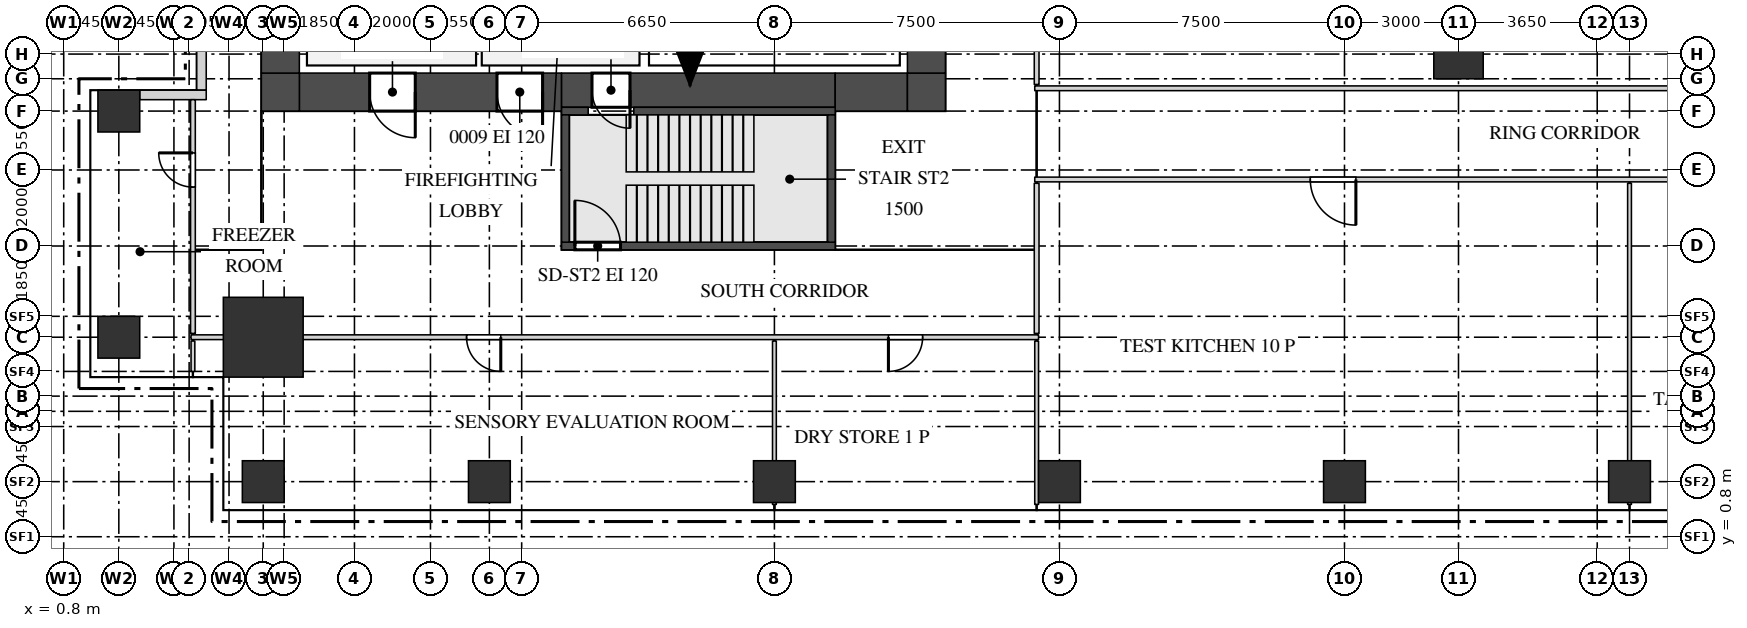
"""IFC4 building model, lengths in metres.
Left out: names, types, materials, properties, quantities, classifications, styles, units other than length and angle.
Written with IfcOpenShell. Run it as: python <this file> out.ifc"""

import sys

from ifc_helpers import new_model, si_unit, direction, frame, frame_2d, origin, origin_2d, place, context, subcontext, project, spatial, rectangle, extrude, source, transform, mapped, element, fill, save


model = new_model("IFC4")
c1 = context("Model", 3, precision=1e-05, world=origin(), true_north=direction((0.0, 1.0)))
c2 = subcontext(c1, "Body", "Model", "MODEL_VIEW")
j1 = project(units=[si_unit("LENGTHUNIT", "METRE"), si_unit("PLANEANGLEUNIT", "RADIAN")], contexts=[c1])
p1 = place(None, origin())
s1 = spatial("IfcSite", under=j1, at=p1, CompositionType="ELEMENT")
p2 = place(p1, origin())
s2 = spatial("IfcBuilding", under=s1, at=p2, CompositionType="ELEMENT")
p3 = place(p2, frame((0.0, 0.0, 114.7)))
s3 = spatial("IfcBuildingStorey", under=s2, at=p3, CompositionType="ELEMENT", Elevation=114.7)
m1 = source(origin(), c2, "Body", "SweptSolid", [
    extrude(rectangle(XDim=6.9, YDim=1.0, at=frame_2d((3.45, 0.0))), origin(), (0.0, 0.0, 1.0), 4.1),
])
p4 = place(p3, frame((7.0, 12.5, 0.0), z_axis=(0.0, 0.0, 1.0), x_axis=(1.0, 0.0, 0.0)))
e1 = element("IfcWall", 1, at=p4, inside=s3, PredefinedType="SHEAR", context=c2, shape_type="MappedRepresentation", body=[
    mapped(m1, transform((0.0, 0.0, 0.0))),
])
m2 = source(origin(), c2, "Body", "SweptSolid", [
    extrude(rectangle(XDim=1.2, YDim=2.1, at=frame_2d((0.6, 1.05))), frame((0.0, 0.51, 0.0), z_axis=(0.0, -1.0, 0.0), x_axis=(1.0, 0.0, 0.0)), (0.0, 0.0, 1.0), 1.02),
])
p5 = place(p4, frame((5.2, 0.0, 0.0)))
e2 = element("IfcOpeningElement", 2, at=p5, cuts=e1, PredefinedType="OPENING", context=c2, shape_type="MappedRepresentation", body=[
    mapped(m2, transform((0.0, 0.0, 0.0))),
])
p6 = place(p4, frame((1.85, 0.0, 0.0)))
e3 = element("IfcOpeningElement", 3, at=p6, cuts=e1, PredefinedType="OPENING", context=c2, shape_type="MappedRepresentation", body=[
    mapped(m2, transform((0.0, 0.0, 0.0))),
])
m3 = source(origin(), c2, "Body", "SweptSolid", [
    extrude(rectangle(XDim=7.2, YDim=0.9, at=frame_2d((3.6, 0.0))), origin(), (0.0, 0.0, 1.0), 4.1),
])
p7 = place(p3, frame((13.9, 12.55, 0.0), z_axis=(0.0, 0.0, 1.0), x_axis=(1.0, 0.0, 0.0)))
e4 = element("IfcWall", 4, at=p7, inside=s3, PredefinedType="SHEAR", context=c2, shape_type="MappedRepresentation", body=[
    mapped(m3, transform((0.0, 0.0, 0.0))),
])
m4 = source(origin(), c2, "Body", "SweptSolid", [
    extrude(rectangle(XDim=1.0, YDim=2.1, at=frame_2d((0.5, 1.05))), frame((0.0, 0.46, 0.0), z_axis=(0.0, -1.0, 0.0), x_axis=(1.0, 0.0, 0.0)), (0.0, 0.0, 1.0), 0.92),
])
p8 = place(p7, frame((0.8, 0.0, 0.0)))
e5 = element("IfcOpeningElement", 5, at=p8, cuts=e4, PredefinedType="OPENING", context=c2, shape_type="MappedRepresentation", body=[
    mapped(m4, transform((0.0, 0.0, 0.0))),
])
m5 = source(origin(), c2, "Body", "SweptSolid", [
    extrude(rectangle(XDim=1.9, YDim=1.0, at=frame_2d((0.95, 0.0))), origin(), (0.0, 0.0, 1.0), 4.1),
])
p9 = place(p3, frame((21.1, 12.5, 0.0), z_axis=(0.0, 0.0, 1.0), x_axis=(1.0, 0.0, 0.0)))
e6 = element("IfcWall", 6, at=p9, inside=s3, PredefinedType="SHEAR", context=c2, shape_type="MappedRepresentation", body=[
    mapped(m5, transform((0.0, 0.0, 0.0))),
])
m6 = source(origin(), c2, "Body", "SweptSolid", [
    extrude(rectangle(XDim=1.0, YDim=1.0, at=frame_2d((0.5, 0.0))), origin(), (0.0, 0.0, 1.0), 4.1),
])
for number, where, z_axis, x_axis in (
    (7, (23.0, 12.5, 0.0), (0.0, 0.0, 1.0), (1.0, 0.0, 0.0)),
    (8, (6.0, 12.5, 0.0), (0.0, 0.0, 1.0), (1.0, 0.0, 0.0)),
):
    element("IfcWall", number, at=place(p3, frame(where, z_axis=z_axis, x_axis=x_axis)), inside=s3, PredefinedType="SHEAR", context=c2, shape_type="MappedRepresentation", body=[
        mapped(m6, transform((0.0, 0.0, 0.0))),
    ])
m7 = source(origin(), c2, "Body", "SweptSolid", [
    extrude(rectangle(XDim=28.0, YDim=1.0, at=frame_2d((14.0, 0.0))), origin(), (0.0, 0.0, 1.0), 4.1),
])
p10 = place(p3, frame((23.5, 13.0, 0.0), z_axis=(0.0, 0.0, 1.0), x_axis=(0.0, 1.0, 0.0)))
e9 = element("IfcWall", 9, at=p10, inside=s3, PredefinedType="SHEAR", context=c2, shape_type="MappedRepresentation", body=[
    mapped(m7, transform((0.0, 0.0, 0.0))),
])
m8 = source(origin(), c2, "Body", "SweptSolid", [
    extrude(rectangle(XDim=1.8, YDim=2.1, at=frame_2d((0.9, 1.05))), frame((0.0, 0.51, 0.0), z_axis=(0.0, -1.0, 0.0), x_axis=(1.0, 0.0, 0.0)), (0.0, 0.0, 1.0), 1.02),
])
p11 = place(p10, frame((22.6, 0.0, 0.0)))
e10 = element("IfcOpeningElement", 10, at=p11, cuts=e9, PredefinedType="OPENING", context=c2, shape_type="MappedRepresentation", body=[
    mapped(m8, transform((0.0, 0.0, 0.0))),
])
p12 = place(p10, frame((13.85, 0.0, 0.0)))
e11 = element("IfcOpeningElement", 11, at=p12, cuts=e9, PredefinedType="OPENING", context=c2, shape_type="MappedRepresentation", body=[
    mapped(m2, transform((0.0, 0.0, 0.0))),
])
m9 = source(origin(), c2, "Body", "SweptSolid", [
    extrude(rectangle(XDim=0.9, YDim=2.1, at=frame_2d((0.45, 1.05))), frame((0.0, 0.51, 0.0), z_axis=(0.0, -1.0, 0.0), x_axis=(1.0, 0.0, 0.0)), (0.0, 0.0, 1.0), 1.02),
])
p13 = place(p10, frame((2.15, 0.0, 0.0)))
e12 = element("IfcOpeningElement", 12, at=p13, cuts=e9, PredefinedType="OPENING", context=c2, shape_type="MappedRepresentation", body=[
    mapped(m9, transform((0.0, 0.0, 0.0))),
])
p14 = place(p10, frame((7.0, 0.0, 0.0)))
e13 = element("IfcOpeningElement", 13, at=p14, cuts=e9, PredefinedType="OPENING", context=c2, shape_type="MappedRepresentation", body=[
    mapped(m9, transform((0.0, 0.0, 0.0))),
])
p15 = place(p3, frame((6.5, 13.0, 0.0), z_axis=(0.0, 0.0, 1.0), x_axis=(0.0, 1.0, 0.0)))
e14 = element("IfcWall", 14, at=p15, inside=s3, PredefinedType="SHEAR", context=c2, shape_type="MappedRepresentation", body=[
    mapped(m7, transform((0.0, 0.0, 0.0))),
])
m10 = source(origin(), c2, "Body", "SweptSolid", [
    extrude(rectangle(XDim=0.7, YDim=0.2, at=frame_2d((0.35, 0.0))), origin(), (0.0, 0.0, 1.0), 4.1),
])
p16 = place(p3, frame((13.9, 12.0, 0.0), z_axis=(0.0, 0.0, 1.0), x_axis=(1.0, 0.0, 0.0)))
e15 = element("IfcWall", 15, at=p16, inside=s3, PredefinedType="SHEAR", context=c2, shape_type="MappedRepresentation", body=[
    mapped(m10, transform((0.0, 0.0, 0.0))),
])
m11 = source(origin(), c2, "Body", "SweptSolid", [
    extrude(rectangle(XDim=5.3, YDim=0.2, at=frame_2d((2.65, 0.0))), origin(), (0.0, 0.0, 1.0), 4.1),
])
p17 = place(p3, frame((15.8, 12.0, 0.0), z_axis=(0.0, 0.0, 1.0), x_axis=(1.0, 0.0, 0.0)))
e16 = element("IfcWall", 16, at=p17, inside=s3, PredefinedType="SHEAR", context=c2, shape_type="MappedRepresentation", body=[
    mapped(m11, transform((0.0, 0.0, 0.0))),
])
m12 = source(origin(), c2, "Body", "SweptSolid", [
    extrude(rectangle(XDim=7.2, YDim=0.2, at=frame_2d((3.6, 0.0))), origin(), (0.0, 0.0, 1.0), 4.1),
])
p18 = place(p3, frame((13.9, 8.45, 0.0), z_axis=(0.0, 0.0, 1.0), x_axis=(1.0, 0.0, 0.0)))
e17 = element("IfcWall", 17, at=p18, inside=s3, PredefinedType="SHEAR", context=c2, shape_type="MappedRepresentation", body=[
    mapped(m12, transform((0.0, 0.0, 0.0))),
])
m13 = source(origin(), c2, "Body", "SweptSolid", [
    extrude(rectangle(XDim=1.2, YDim=2.1, at=frame_2d((0.6, 1.05))), frame((0.0, 0.11, 0.0), z_axis=(0.0, -1.0, 0.0), x_axis=(1.0, 0.0, 0.0)), (0.0, 0.0, 1.0), 0.22),
])
p19 = place(p18, frame((0.35, 0.0, 0.0)))
e18 = element("IfcOpeningElement", 18, at=p19, cuts=e17, PredefinedType="OPENING", context=c2, shape_type="MappedRepresentation", body=[
    mapped(m13, transform((0.0, 0.0, 0.0))),
])
m14 = source(origin(), c2, "Body", "SweptSolid", [
    extrude(rectangle(XDim=3.35, YDim=0.2, at=frame_2d((1.675, 0.0))), origin(), (0.0, 0.0, 1.0), 4.1),
])
for number, where, z_axis, x_axis in (
    (19, (21.0, 8.55, 0.0), (0.0, 0.0, 1.0), (0.0, 1.0, 0.0)),
    (20, (14.0, 8.55, 0.0), (0.0, 0.0, 1.0), (0.0, 1.0, 0.0)),
):
    element("IfcWall", number, at=place(p3, frame(where, z_axis=z_axis, x_axis=x_axis)), inside=s3, PredefinedType="SHEAR", context=c2, shape_type="MappedRepresentation", body=[
        mapped(m14, transform((0.0, 0.0, 0.0))),
    ])
m15 = source(origin(), c2, "Body", "SweptSolid", [
    extrude(rectangle(XDim=2.1, YDim=2.1, at=origin_2d()), origin(), (0.0, 0.0, 1.0), 4.4),
])
p20 = place(p3, frame((6.05, 6.05, 0.0), z_axis=(0.0, 0.0, 1.0), x_axis=(1.0, 0.0, 0.0)))
e21 = element("IfcColumn", 21, at=p20, inside=s3, PredefinedType="COLUMN", context=c2, shape_type="MappedRepresentation", body=[
    mapped(m15, transform((0.0, 0.0, 0.0))),
])
m16 = source(origin(), c2, "Body", "SweptSolid", [
    extrude(rectangle(XDim=1.1, YDim=1.1, at=origin_2d()), origin(), (0.0, 0.0, 1.0), 4.1),
])
for number, where, z_axis, x_axis in (
    (22, (6.05, 2.25, 0.0), (0.0, 0.0, 1.0), (1.0, 0.0, 0.0)),
    (23, (12.0, 2.25, 0.0), (0.0, 0.0, 1.0), (1.0, 0.0, 0.0)),
    (24, (19.5, 2.25, 0.0), (0.0, 0.0, 1.0), (1.0, 0.0, 0.0)),
    (25, (27.0, 2.25, 0.0), (0.0, 0.0, 1.0), (1.0, 0.0, 0.0)),
    (26, (34.5, 2.25, 0.0), (0.0, 0.0, 1.0), (1.0, 0.0, 0.0)),
    (27, (42.0, 2.25, 0.0), (0.0, 0.0, 1.0), (1.0, 0.0, 0.0)),
    (28, (2.25, 6.05, 0.0), (0.0, 0.0, 1.0), (1.0, 0.0, 0.0)),
    (29, (2.25, 12.0, 0.0), (0.0, 0.0, 1.0), (1.0, 0.0, 0.0)),
):
    element("IfcColumn", number, at=place(p3, frame(where, z_axis=z_axis, x_axis=x_axis)), inside=s3, PredefinedType="COLUMN", context=c2, shape_type="MappedRepresentation", body=[
        mapped(m16, transform((0.0, 0.0, 0.0))),
    ])
m17 = source(origin(), c2, "Body", "SweptSolid", [
    extrude(rectangle(XDim=1.3, YDim=1.3, at=origin_2d()), origin(), (0.0, 0.0, 1.0), 4.1),
])
p21 = place(p3, frame((37.5, 13.5, 0.0), z_axis=(0.0, 0.0, 1.0), x_axis=(1.0, 0.0, 0.0)))
e30 = element("IfcColumn", 30, at=p21, inside=s3, PredefinedType="COLUMN", context=c2, shape_type="MappedRepresentation", body=[
    mapped(m17, transform((0.0, 0.0, 0.0))),
])
m18 = source(origin(), c2, "Body", "SweptSolid", [
    extrude(rectangle(XDim=6.4, YDim=0.25, at=frame_2d((3.2, 0.0))), origin(), (0.0, 0.0, 1.0), 3.5),
])
p22 = place(p3, frame((4.425, 12.55, 0.0), z_axis=(0.0, 0.0, 1.0), x_axis=(0.0, 1.0, 0.0)))
e31 = element("IfcWall", 31, at=p22, inside=s3, PredefinedType="SOLIDWALL", context=c2, shape_type="MappedRepresentation", body=[
    mapped(m18, transform((0.0, 0.0, 0.0))),
])
m19 = source(origin(), c2, "Body", "SweptSolid", [
    extrude(rectangle(XDim=1.65, YDim=2.4, at=frame_2d((0.825, 1.2))), frame((0.0, 0.135, 0.0), z_axis=(0.0, -1.0, 0.0), x_axis=(1.0, 0.0, 0.0)), (0.0, 0.0, 1.0), 0.27),
])
p23 = place(p22, frame((0.35, 0.0, 0.0)))
e32 = element("IfcOpeningElement", 32, at=p23, cuts=e31, PredefinedType="OPENING", context=c2, shape_type="MappedRepresentation", body=[
    mapped(m19, transform((0.0, 0.0, 0.0))),
])
p24 = place(p22, frame((4.4, 0.0, 0.0)))
e33 = element("IfcOpeningElement", 33, at=p24, cuts=e31, PredefinedType="OPENING", context=c2, shape_type="MappedRepresentation", body=[
    mapped(m19, transform((0.0, 0.0, 0.0))),
])
m20 = source(origin(), c2, "Body", "SweptSolid", [
    extrude(rectangle(XDim=1.8, YDim=2.4, at=frame_2d((0.9, 1.2))), frame((0.0, 0.135, 0.0), z_axis=(0.0, -1.0, 0.0), x_axis=(1.0, 0.0, 0.0)), (0.0, 0.0, 1.0), 0.27),
])
p25 = place(p22, frame((2.3, 0.0, 0.0)))
e34 = element("IfcOpeningElement", 34, at=p25, cuts=e31, PredefinedType="OPENING", context=c2, shape_type="MappedRepresentation", body=[
    mapped(m20, transform((0.0, 0.0, 0.0))),
])
m21 = source(origin(), c2, "Body", "SweptSolid", [
    extrude(rectangle(XDim=1.75, YDim=0.25, at=frame_2d((0.875, 0.0))), origin(), (0.0, 0.0, 1.0), 3.5),
])
p26 = place(p3, frame((2.8, 12.425, 0.0), z_axis=(0.0, 0.0, 1.0), x_axis=(1.0, 0.0, 0.0)))
e35 = element("IfcWall", 35, at=p26, inside=s3, PredefinedType="SOLIDWALL", context=c2, shape_type="MappedRepresentation", body=[
    mapped(m21, transform((0.0, 0.0, 0.0))),
])
m22 = source(origin(), c2, "Body", "SweptSolid", [
    extrude(rectangle(XDim=4.3, YDim=0.1, at=frame_2d((2.15, 0.0))), origin(), (0.0, 0.0, 1.0), 3.77),
])
p27 = place(p3, frame((19.5, 1.65, 0.0), z_axis=(0.0, 0.0, 1.0), x_axis=(0.0, 1.0, 0.0)))
e36 = element("IfcWall", 36, at=p27, inside=s3, PredefinedType="PARTITIONING", context=c2, shape_type="MappedRepresentation", body=[
    mapped(m22, transform((0.0, 0.0, 0.0))),
])
m23 = source(origin(), c2, "Body", "SweptSolid", [
    extrude(rectangle(XDim=4.3, YDim=0.1, at=frame_2d((2.15, 0.0))), origin(), (0.0, 0.0, 1.0), 4.2),
])
p28 = place(p3, frame((26.4, 1.65, 0.0), z_axis=(0.0, 0.0, 1.0), x_axis=(0.0, 1.0, 0.0)))
e37 = element("IfcWall", 37, at=p28, inside=s3, PredefinedType="PARTITIONING", context=c2, shape_type="MappedRepresentation", body=[
    mapped(m23, transform((0.0, 0.0, 0.0))),
])
m24 = source(origin(), c2, "Body", "SweptSolid", [
    extrude(rectangle(XDim=8.45, YDim=0.1, at=frame_2d((4.225, 0.0))), origin(), (0.0, 0.0, 1.0), 3.6),
])
p29 = place(p3, frame((42.0, 1.65, 0.0), z_axis=(0.0, 0.0, 1.0), x_axis=(0.0, 1.0, 0.0)))
e38 = element("IfcWall", 38, at=p29, inside=s3, PredefinedType="PARTITIONING", context=c2, shape_type="MappedRepresentation", body=[
    mapped(m24, transform((0.0, 0.0, 0.0))),
])
m25 = source(origin(), c2, "Body", "SweptSolid", [
    extrude(rectangle(XDim=0.8, YDim=0.1, at=frame_2d((0.4, 0.0))), origin(), (0.0, 0.0, 1.0), 4.2),
])
p30 = place(p3, frame((4.2, 5.15, 0.0), z_axis=(0.0, 0.0, 1.0), x_axis=(0.0, 1.0, 0.0)))
e39 = element("IfcWall", 39, at=p30, inside=s3, PredefinedType="PARTITIONING", context=c2, shape_type="MappedRepresentation", body=[
    mapped(m25, transform((0.0, 0.0, 0.0))),
])
m26 = source(origin(), c2, "Body", "SweptSolid", [
    extrude(rectangle(XDim=22.3, YDim=0.125, at=frame_2d((11.15, 0.0))), origin(), (0.0, 0.0, 1.0), 3.55),
])
p31 = place(p3, frame((4.15, 6.05, 0.0), z_axis=(0.0, 0.0, 1.0), x_axis=(1.0, 0.0, 0.0)))
e40 = element("IfcWall", 40, at=p31, inside=s3, PredefinedType="PARTITIONING", context=c2, shape_type="MappedRepresentation", body=[
    mapped(m26, transform((0.0, 0.0, 0.0))),
])
m27 = source(origin(), c2, "Body", "SweptSolid", [
    extrude(rectangle(XDim=0.9, YDim=2.1, at=frame_2d((0.45, 1.05))), frame((0.0, 0.073, 0.0), z_axis=(0.0, -1.0, 0.0), x_axis=(1.0, 0.0, 0.0)), (0.0, 0.0, 1.0), 0.145),
])
p32 = place(p31, frame((7.25, 0.0, 0.0)))
e41 = element("IfcOpeningElement", 41, at=p32, cuts=e40, PredefinedType="OPENING", context=c2, shape_type="MappedRepresentation", body=[
    mapped(m27, transform((0.0, 0.0, 0.0))),
])
p33 = place(p31, frame((18.35, 0.0, 0.0)))
e42 = element("IfcOpeningElement", 42, at=p33, cuts=e40, PredefinedType="OPENING", context=c2, shape_type="MappedRepresentation", body=[
    mapped(m27, transform((0.0, 0.0, 0.0))),
])
m28 = source(origin(), c2, "Body", "SweptSolid", [
    extrude(rectangle(XDim=6.15, YDim=0.125, at=frame_2d((3.075, 0.0))), origin(), (0.0, 0.0, 1.0), 4.2),
])
p34 = place(p3, frame((4.2, 6.15, 0.0), z_axis=(0.0, 0.0, 1.0), x_axis=(0.0, 1.0, 0.0)))
e43 = element("IfcWall", 43, at=p34, inside=s3, PredefinedType="PARTITIONING", context=c2, shape_type="MappedRepresentation", body=[
    mapped(m28, transform((0.0, 0.0, 0.0))),
])
p35 = place(p34, frame((3.85, 0.0, 0.0)))
e44 = element("IfcOpeningElement", 44, at=p35, cuts=e43, PredefinedType="OPENING", context=c2, shape_type="MappedRepresentation", body=[
    mapped(m27, transform((0.0, 0.0, 0.0))),
])
m29 = source(origin(), c2, "Body", "SweptSolid", [
    extrude(rectangle(XDim=3.95, YDim=0.125, at=frame_2d((1.975, 0.0))), origin(), (0.0, 0.0, 1.0), 4.2),
])
p36 = place(p3, frame((26.4, 6.15, 0.0), z_axis=(0.0, 0.0, 1.0), x_axis=(0.0, 1.0, 0.0)))
e45 = element("IfcWall", 45, at=p36, inside=s3, PredefinedType="PARTITIONING", context=c2, shape_type="MappedRepresentation", body=[
    mapped(m29, transform((0.0, 0.0, 0.0))),
])
m30 = source(origin(), c2, "Body", "SweptSolid", [
    extrude(rectangle(XDim=20.0, YDim=0.125, at=frame_2d((10.0, 0.0))), origin(), (0.0, 0.0, 1.0), 4.2),
])
p37 = place(p3, frame((26.35, 10.2, 0.0), z_axis=(0.0, 0.0, 1.0), x_axis=(1.0, 0.0, 0.0)))
e46 = element("IfcWall", 46, at=p37, inside=s3, PredefinedType="PARTITIONING", context=c2, shape_type="MappedRepresentation", body=[
    mapped(m30, transform((0.0, 0.0, 0.0))),
])
m31 = source(origin(), c2, "Body", "SweptSolid", [
    extrude(rectangle(XDim=1.2, YDim=2.1, at=frame_2d((0.6, 1.05))), frame((0.0, 0.073, 0.0), z_axis=(0.0, -1.0, 0.0), x_axis=(1.0, 0.0, 0.0)), (0.0, 0.0, 1.0), 0.145),
])
p38 = place(p37, frame((7.25, 0.0, 0.0)))
e47 = element("IfcOpeningElement", 47, at=p38, cuts=e46, PredefinedType="OPENING", context=c2, shape_type="MappedRepresentation", body=[
    mapped(m31, transform((0.0, 0.0, 0.0))),
])
p39 = place(p37, frame((18.4, 0.0, 0.0)))
e48 = element("IfcOpeningElement", 48, at=p39, cuts=e46, PredefinedType="OPENING", context=c2, shape_type="MappedRepresentation", body=[
    mapped(m31, transform((0.0, 0.0, 0.0))),
])
m32 = source(origin(), c2, "Body", "SweptSolid", [
    extrude(rectangle(XDim=17.7, YDim=0.125, at=frame_2d((8.85, 0.0))), origin(), (0.0, 0.0, 1.0), 4.2),
])
p40 = place(p3, frame((26.35, 12.6, 0.0), z_axis=(0.0, 0.0, 1.0), x_axis=(1.0, 0.0, 0.0)))
e49 = element("IfcWall", 49, at=p40, inside=s3, PredefinedType="PARTITIONING", context=c2, shape_type="MappedRepresentation", body=[
    mapped(m32, transform((0.0, 0.0, 0.0))),
])
m33 = source(origin(), c2, "Body", "SweptSolid", [
    extrude(rectangle(XDim=23.2, YDim=0.125, at=frame_2d((11.6, 0.0))), origin(), (0.0, 0.0, 1.0), 4.2),
])
p41 = place(p3, frame((26.4, 12.7, 0.0), z_axis=(0.0, 0.0, 1.0), x_axis=(0.0, 1.0, 0.0)))
e50 = element("IfcWall", 50, at=p41, inside=s3, PredefinedType="PARTITIONING", context=c2, shape_type="MappedRepresentation", body=[
    mapped(m33, transform((0.0, 0.0, 0.0))),
])
p42 = place(p41, frame((6.65, 0.0, 0.0)))
e51 = element("IfcOpeningElement", 51, at=p42, cuts=e50, PredefinedType="OPENING", context=c2, shape_type="MappedRepresentation", body=[
    mapped(m31, transform((0.0, 0.0, 0.0))),
])
m34 = source(origin(), c2, "Body", "SweptSolid", [
    extrude(rectangle(XDim=1.65, YDim=2.4, at=frame_2d((0.825, 1.2))), frame((0.0, 0.03, 0.0), z_axis=(0.0, -1.0, 0.0), x_axis=(1.0, 0.0, 0.0)), (0.0, 0.0, 1.0), 0.06),
])
p43 = place(p23, origin())
e52 = element("IfcWindow", 52, at=p43, inside=s3, PartitioningType="SINGLE_PANEL", PredefinedType="WINDOW", context=c2, shape_type="MappedRepresentation", body=[
    mapped(m34, transform((0.0, 0.0, 0.0))),
])
fill(e32, e52)
m35 = source(origin(), c2, "Body", "SweptSolid", [
    extrude(rectangle(XDim=1.2, YDim=2.1, at=frame_2d((0.6, 1.05))), frame((0.0, 0.45, 0.0), z_axis=(0.0, -1.0, 0.0), x_axis=(1.0, 0.0, 0.0)), (0.0, 0.0, 1.0), 0.9),
])
p44 = place(p5, origin())
e53 = element("IfcDoor", 53, at=p44, inside=s3, OperationType="SINGLE_SWING_RIGHT", PredefinedType="DOOR", context=c2, shape_type="MappedRepresentation", body=[
    mapped(m35, transform((0.0, 0.0, 0.0))),
])
fill(e2, e53)
p45 = place(p6, origin())
e54 = element("IfcDoor", 54, at=p45, inside=s3, OperationType="SINGLE_SWING_RIGHT", PredefinedType="DOOR", context=c2, shape_type="MappedRepresentation", body=[
    mapped(m35, transform((0.0, 0.0, 0.0))),
])
fill(e3, e54)
m36 = source(origin(), c2, "Body", "SweptSolid", [
    extrude(rectangle(XDim=1.0, YDim=2.1, at=frame_2d((0.5, 1.05))), frame((0.0, 0.4, 0.0), z_axis=(0.0, -1.0, 0.0), x_axis=(1.0, 0.0, 0.0)), (0.0, 0.0, 1.0), 0.8),
])
p46 = place(p8, origin())
e55 = element("IfcDoor", 55, at=p46, inside=s3, OperationType="SINGLE_SWING_RIGHT", PredefinedType="DOOR", context=c2, shape_type="MappedRepresentation", body=[
    mapped(m36, transform((0.0, 0.0, 0.0))),
])
fill(e5, e55)
m37 = source(origin(), c2, "Body", "SweptSolid", [
    extrude(rectangle(XDim=1.2, YDim=2.1, at=frame_2d((0.6, 1.05))), frame((0.0, 0.025, 0.0), z_axis=(0.0, -1.0, 0.0), x_axis=(1.0, 0.0, 0.0)), (0.0, 0.0, 1.0), 0.05),
])
p47 = place(p38, origin())
e56 = element("IfcDoor", 56, at=p47, inside=s3, OperationType="SINGLE_SWING_RIGHT", PredefinedType="DOOR", context=c2, shape_type="MappedRepresentation", body=[
    mapped(m37, transform((0.0, 0.0, 0.0))),
])
fill(e47, e56)
m38 = source(origin(), c2, "Body", "SweptSolid", [
    extrude(rectangle(XDim=0.9, YDim=2.1, at=frame_2d((0.45, 1.05))), frame((0.0, 0.025, 0.0), z_axis=(0.0, -1.0, 0.0), x_axis=(1.0, 0.0, 0.0)), (0.0, 0.0, 1.0), 0.05),
])
p48 = place(p32, origin())
e57 = element("IfcDoor", 57, at=p48, inside=s3, OperationType="SINGLE_SWING_RIGHT", PredefinedType="DOOR", context=c2, shape_type="MappedRepresentation", body=[
    mapped(m38, transform((0.0, 0.0, 0.0))),
])
fill(e41, e57)
p49 = place(p33, origin())
e58 = element("IfcDoor", 58, at=p49, inside=s3, OperationType="SINGLE_SWING_LEFT", PredefinedType="DOOR", context=c2, shape_type="MappedRepresentation", body=[
    mapped(m38, transform((0.0, 0.0, 0.0))),
])
fill(e42, e58)
p50 = place(p35, origin())
e59 = element("IfcDoor", 59, at=p50, inside=s3, OperationType="SINGLE_SWING_LEFT", PredefinedType="DOOR", context=c2, shape_type="MappedRepresentation", body=[
    mapped(m38, transform((0.0, 0.0, 0.0))),
])
fill(e44, e59)
p51 = place(p19, origin())
e60 = element("IfcDoor", 60, at=p51, inside=s3, OperationType="SINGLE_SWING_RIGHT", PredefinedType="DOOR", context=c2, shape_type="MappedRepresentation", body=[
    mapped(m37, transform((0.0, 0.0, 0.0))),
])
fill(e18, e60)
save(model, sys.argv[1])
